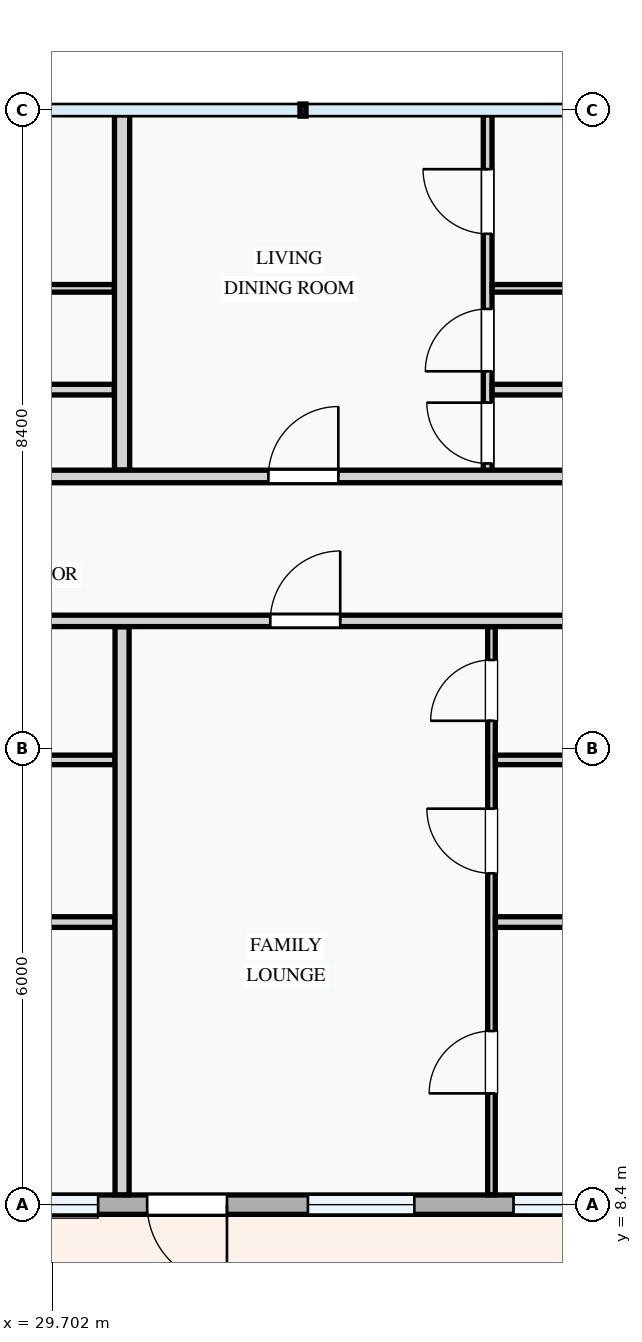
"""IFC4 building model, lengths in metres.
Left out: names, types, materials, properties, quantities, classifications, styles, units other than length and angle.
Written with IfcOpenShell. Run it as: python <this file> out.ifc"""

import sys

from ifc_helpers import new_model, si_unit, direction, frame, frame_2d, origin, place, context, subcontext, project, spatial, rectangle, extrude, element, fill, save


model = new_model("IFC4")
c1 = context("Model", 3, precision=1e-05, world=origin(), true_north=direction((0.0, 1.0)))
c2 = subcontext(c1, "Body", "Model", "MODEL_VIEW")
j1 = project(units=[si_unit("LENGTHUNIT", "METRE"), si_unit("PLANEANGLEUNIT", "RADIAN")], contexts=[c1])
p1 = place(None, origin())
s1 = spatial("IfcSite", under=j1, at=p1, CompositionType="ELEMENT")
p2 = place(p1, origin())
s2 = spatial("IfcBuilding", under=s1, at=p2, CompositionType="ELEMENT")
p3 = place(p2, frame((0.0, 0.0, 31.2)))
s3 = spatial("IfcBuildingStorey", under=s2, at=p3, CompositionType="ELEMENT", Elevation=31.2)
p4 = place(p3, frame((28.8, 8.4, 0.0), z_axis=(0.0, 0.0, 1.0), x_axis=(1.0, 0.0, 0.0)))
e1 = element("IfcWall", 1, at=p4, inside=s3, PredefinedType="STANDARD", context=c2, shape_type="SweptSolid", body=[
    extrude(rectangle(XDim=8.4, YDim=0.255, at=frame_2d((4.2, 0.0))), origin(), (0.0, 0.0, 1.0), 2.375),
])
p5 = place(p4, frame((2.15, 0.0, 0.0)))
e2 = element("IfcOpeningElement", 2, at=p5, cuts=e1, PredefinedType="OPENING", context=c2, shape_type="SweptSolid", body=[
    extrude(rectangle(XDim=1.05, YDim=2.15, at=frame_2d((0.525, 1.075))), frame((0.0, 0.137, 0.0), z_axis=(0.0, -1.0, 0.0), x_axis=(1.0, 0.0, 0.0)), (0.0, 0.0, 1.0), 0.275),
])
p6 = place(p4, frame((0.505, 0.0, 0.78)))
e3 = element("IfcOpeningElement", 3, at=p6, cuts=e1, PredefinedType="OPENING", context=c2, shape_type="SweptSolid", body=[
    extrude(rectangle(XDim=1.0, YDim=1.25, at=frame_2d((0.5, 0.625))), frame((0.0, 0.137, 0.0), z_axis=(0.0, -1.0, 0.0), x_axis=(1.0, 0.0, 0.0)), (0.0, 0.0, 1.0), 0.275),
])
p7 = place(p4, frame((4.265, 0.0, 0.78)))
e4 = element("IfcOpeningElement", 4, at=p7, cuts=e1, PredefinedType="OPENING", context=c2, shape_type="SweptSolid", body=[
    extrude(rectangle(XDim=1.4, YDim=1.45, at=frame_2d((0.7, 0.725))), frame((0.0, 0.137, 0.0), z_axis=(0.0, -1.0, 0.0), x_axis=(1.0, 0.0, 0.0)), (0.0, 0.0, 1.0), 0.275),
])
p8 = place(p4, frame((6.97, 0.0, 0.78)))
e5 = element("IfcOpeningElement", 5, at=p8, cuts=e1, PredefinedType="OPENING", context=c2, shape_type="SweptSolid", body=[
    extrude(rectangle(XDim=0.95, YDim=1.15, at=frame_2d((0.475, 0.575))), frame((0.0, 0.137, 0.0), z_axis=(0.0, -1.0, 0.0), x_axis=(1.0, 0.0, 0.0)), (0.0, 0.0, 1.0), 0.275),
])
p9 = place(p3, frame((26.692, 12.118, 0.0), z_axis=(0.0, 0.0, 1.0), x_axis=(1.0, 0.0, 0.0)))
e6 = element("IfcWall", 6, at=p9, inside=s3, PredefinedType="PARTITIONING", context=c2, shape_type="SweptSolid", body=[
    extrude(rectangle(XDim=3.833, YDim=0.14, at=frame_2d((1.917, 0.0))), origin(), (0.0, 0.0, 1.0), 3.0),
])
p10 = place(p3, frame((26.692, 14.251, 0.0), z_axis=(0.0, 0.0, 1.0), x_axis=(1.0, 0.0, 0.0)))
e7 = element("IfcWall", 7, at=p10, inside=s3, PredefinedType="PARTITIONING", context=c2, shape_type="SweptSolid", body=[
    extrude(rectangle(XDim=3.833, YDim=0.125, at=frame_2d((1.917, 0.0))), origin(), (0.0, 0.0, 1.0), 2.375),
])
p11 = place(p3, frame((26.54, 20.455, 0.0), z_axis=(0.0, 0.0, 1.0), x_axis=(1.0, 0.0, 0.0)))
e8 = element("IfcWall", 8, at=p11, inside=s3, PredefinedType="PARTITIONING", context=c2, shape_type="SweptSolid", body=[
    extrude(rectangle(XDim=3.978, YDim=0.1, at=frame_2d((1.989, 0.0))), origin(), (0.0, 0.0, 1.0), 3.0),
])
p12 = place(p3, frame((26.54, 19.122, 0.0), z_axis=(0.0, 0.0, 1.0), x_axis=(1.0, 0.0, 0.0)))
e9 = element("IfcWall", 9, at=p12, inside=s3, PredefinedType="PARTITIONING", context=c2, shape_type="SweptSolid", body=[
    extrude(rectangle(XDim=3.978, YDim=0.14, at=frame_2d((1.989, 0.0))), origin(), (0.0, 0.0, 1.0), 3.0),
])
p13 = place(p3, frame((35.48, 8.53, 0.0), z_axis=(0.0, 0.0, 1.0), x_axis=(0.0, 1.0, 0.0)))
e10 = element("IfcWall", 10, at=p13, inside=s3, PredefinedType="PARTITIONING", context=c2, shape_type="SweptSolid", body=[
    extrude(rectangle(XDim=7.473, YDim=0.1, at=frame_2d((3.737, 0.0))), origin(), (0.0, 0.0, 1.0), 3.0),
])
p14 = place(p13, frame((1.334, 0.0, 0.0)))
e11 = element("IfcOpeningElement", 11, at=p14, cuts=e10, PredefinedType="OPENING", context=c2, shape_type="SweptSolid", body=[
    extrude(rectangle(XDim=0.82, YDim=2.08, at=frame_2d((0.41, 1.04))), frame((0.0, 0.06, 0.0), z_axis=(0.0, -1.0, 0.0), x_axis=(1.0, 0.0, 0.0)), (0.0, 0.0, 1.0), 0.12),
])
p15 = place(p13, frame((4.23, 0.0, 0.0)))
e12 = element("IfcOpeningElement", 12, at=p15, cuts=e10, PredefinedType="OPENING", context=c2, shape_type="SweptSolid", body=[
    extrude(rectangle(XDim=0.85, YDim=2.1, at=frame_2d((0.425, 1.05))), frame((0.0, 0.06, 0.0), z_axis=(0.0, -1.0, 0.0), x_axis=(1.0, 0.0, 0.0)), (0.0, 0.0, 1.0), 0.12),
])
p16 = place(p13, frame((6.236, 0.0, 0.0)))
e13 = element("IfcOpeningElement", 13, at=p16, cuts=e10, PredefinedType="OPENING", context=c2, shape_type="SweptSolid", body=[
    extrude(rectangle(XDim=0.8, YDim=2.1, at=frame_2d((0.4, 1.05))), frame((0.0, 0.06, 0.0), z_axis=(0.0, -1.0, 0.0), x_axis=(1.0, 0.0, 0.0)), (0.0, 0.0, 1.0), 0.12),
])
p17 = place(p3, frame((35.532, 12.118, 0.0), z_axis=(0.0, 0.0, 1.0), x_axis=(1.0, 0.0, 0.0)))
e14 = element("IfcWall", 14, at=p17, inside=s3, PredefinedType="PARTITIONING", context=c2, shape_type="SweptSolid", body=[
    extrude(rectangle(XDim=7.539, YDim=0.14, at=frame_2d((3.769, 0.0))), origin(), (0.0, 0.0, 1.0), 3.0),
])
p18 = place(p3, frame((35.532, 14.251, 0.0), z_axis=(0.0, 0.0, 1.0), x_axis=(1.0, 0.0, 0.0)))
e15 = element("IfcWall", 15, at=p18, inside=s3, PredefinedType="PARTITIONING", context=c2, shape_type="SweptSolid", body=[
    extrude(rectangle(XDim=7.539, YDim=0.125, at=frame_2d((3.769, 0.0))), origin(), (0.0, 0.0, 1.0), 2.375),
])
p19 = place(p3, frame((35.43, 17.98, 0.0), z_axis=(0.0, 0.0, 1.0), x_axis=(0.0, 1.0, 0.0)))
e16 = element("IfcWall", 16, at=p19, inside=s3, PredefinedType="PARTITIONING", context=c2, shape_type="SweptSolid", body=[
    extrude(rectangle(XDim=4.76, YDim=0.115, at=frame_2d((2.38, 0.0))), origin(), (0.0, 0.0, 1.0), 3.0),
])
p20 = place(p19, frame((0.171, 0.0, 0.0)))
e17 = element("IfcOpeningElement", 17, at=p20, cuts=e16, PredefinedType="OPENING", context=c2, shape_type="SweptSolid", body=[
    extrude(rectangle(XDim=0.8, YDim=2.1, at=frame_2d((0.4, 1.05))), frame((0.0, 0.067, 0.0), z_axis=(0.0, -1.0, 0.0), x_axis=(1.0, 0.0, 0.0)), (0.0, 0.0, 1.0), 0.135),
])
p21 = place(p19, frame((1.384, 0.0, 0.0)))
e18 = element("IfcOpeningElement", 18, at=p21, cuts=e16, PredefinedType="OPENING", context=c2, shape_type="SweptSolid", body=[
    extrude(rectangle(XDim=0.82, YDim=2.08, at=frame_2d((0.41, 1.04))), frame((0.0, 0.067, 0.0), z_axis=(0.0, -1.0, 0.0), x_axis=(1.0, 0.0, 0.0)), (0.0, 0.0, 1.0), 0.135),
])
p22 = place(p19, frame((3.193, 0.0, 0.0)))
e19 = element("IfcOpeningElement", 19, at=p22, cuts=e16, PredefinedType="OPENING", context=c2, shape_type="SweptSolid", body=[
    extrude(rectangle(XDim=0.85, YDim=2.1, at=frame_2d((0.425, 1.05))), frame((0.0, 0.067, 0.0), z_axis=(0.0, -1.0, 0.0), x_axis=(1.0, 0.0, 0.0)), (0.0, 0.0, 1.0), 0.135),
])
p23 = place(p3, frame((35.489, 20.455, 0.0), z_axis=(0.0, 0.0, 1.0), x_axis=(1.0, 0.0, 0.0)))
e20 = element("IfcWall", 20, at=p23, inside=s3, PredefinedType="PARTITIONING", context=c2, shape_type="SweptSolid", body=[
    extrude(rectangle(XDim=7.651, YDim=0.1, at=frame_2d((3.825, 0.0))), origin(), (0.0, 0.0, 1.0), 3.0),
])
p24 = place(p3, frame((35.489, 19.122, 0.0), z_axis=(0.0, 0.0, 1.0), x_axis=(1.0, 0.0, 0.0)))
e21 = element("IfcWall", 21, at=p24, inside=s3, PredefinedType="PARTITIONING", context=c2, shape_type="SweptSolid", body=[
    extrude(rectangle(XDim=7.651, YDim=0.14, at=frame_2d((3.825, 0.0))), origin(), (0.0, 0.0, 1.0), 3.0),
])
p25 = place(p3, frame((30.62, 8.53, 0.0), z_axis=(0.0, 0.0, 1.0), x_axis=(0.0, 1.0, 0.0)))
e22 = element("IfcWall", 22, at=p25, inside=s3, PredefinedType="PARTITIONING", context=c2, shape_type="SweptSolid", body=[
    extrude(rectangle(XDim=7.473, YDim=0.185, at=frame_2d((3.737, 0.0))), origin(), (0.0, 0.0, 1.0), 3.0),
])
p26 = place(p3, frame((30.62, 18.064, 0.0), z_axis=(0.0, 0.0, 1.0), x_axis=(0.0, 1.0, 0.0)))
e23 = element("IfcWall", 23, at=p26, inside=s3, PredefinedType="PARTITIONING", context=c2, shape_type="SweptSolid", body=[
    extrude(rectangle(XDim=4.676, YDim=0.2, at=frame_2d((2.338, 0.0))), origin(), (0.0, 0.0, 1.0), 3.0),
])
p27 = place(p3, frame((22.66, 16.08, 0.0), z_axis=(0.0, 0.0, 1.0), x_axis=(1.0, 0.0, 0.0)))
e24 = element("IfcWall", 24, at=p27, inside=s3, PredefinedType="PARTITIONING", context=c2, shape_type="SweptSolid", body=[
    extrude(rectangle(XDim=20.48, YDim=0.15, at=frame_2d((10.24, 0.0))), origin(), (0.0, 0.0, 1.0), 3.0),
])
p28 = place(p27, frame((2.691, 0.0, 0.0)))
e25 = element("IfcOpeningElement", 25, at=p28, cuts=e24, PredefinedType="OPENING", context=c2, shape_type="SweptSolid", body=[
    extrude(rectangle(XDim=0.96, YDim=2.12, at=frame_2d((0.48, 1.06))), frame((0.0, 0.085, 0.0), z_axis=(0.0, -1.0, 0.0), x_axis=(1.0, 0.0, 0.0)), (0.0, 0.0, 1.0), 0.17),
])
p29 = place(p27, frame((9.91, 0.0, 0.0)))
e26 = element("IfcOpeningElement", 26, at=p29, cuts=e24, PredefinedType="OPENING", context=c2, shape_type="SweptSolid", body=[
    extrude(rectangle(XDim=0.92, YDim=2.1, at=frame_2d((0.46, 1.05))), frame((0.0, 0.085, 0.0), z_axis=(0.0, -1.0, 0.0), x_axis=(1.0, 0.0, 0.0)), (0.0, 0.0, 1.0), 0.17),
])
p30 = place(p3, frame((22.66, 17.98, 0.0), z_axis=(0.0, 0.0, 1.0), x_axis=(1.0, 0.0, 0.0)))
e27 = element("IfcWall", 27, at=p30, inside=s3, PredefinedType="PARTITIONING", context=c2, shape_type="SweptSolid", body=[
    extrude(rectangle(XDim=20.48, YDim=0.165, at=frame_2d((10.24, 0.0))), origin(), (0.0, 0.0, 1.0), 3.0),
])
p31 = place(p30, frame((2.611, 0.0, 0.0)))
e28 = element("IfcOpeningElement", 28, at=p31, cuts=e27, PredefinedType="OPENING", context=c2, shape_type="SweptSolid", body=[
    extrude(rectangle(XDim=0.92, YDim=2.1, at=frame_2d((0.46, 1.05))), frame((0.0, 0.093, 0.0), z_axis=(0.0, -1.0, 0.0), x_axis=(1.0, 0.0, 0.0)), (0.0, 0.0, 1.0), 0.185),
])
p32 = place(p30, frame((9.885, 0.0, 0.0)))
e29 = element("IfcOpeningElement", 29, at=p32, cuts=e27, PredefinedType="OPENING", context=c2, shape_type="SweptSolid", body=[
    extrude(rectangle(XDim=0.92, YDim=2.1, at=frame_2d((0.46, 1.05))), frame((0.0, 0.093, 0.0), z_axis=(0.0, -1.0, 0.0), x_axis=(1.0, 0.0, 0.0)), (0.0, 0.0, 1.0), 0.185),
])
p33 = place(p5, frame((1.05, 0.0, 0.0), z_axis=(0.0, 0.0, 1.0), x_axis=(-1.0, 0.0, 0.0)))
e30 = element("IfcDoor", 30, at=p33, inside=s3, OperationType="SINGLE_SWING_LEFT", PredefinedType="DOOR", context=c2, shape_type="SweptSolid", body=[
    extrude(rectangle(XDim=1.05, YDim=2.15, at=frame_2d((0.525, 1.075))), frame((0.0, 0.025, 0.0), z_axis=(0.0, -1.0, 0.0), x_axis=(1.0, 0.0, 0.0)), (0.0, 0.0, 1.0), 0.05),
])
fill(e2, e30)
p34 = place(p6, origin())
e31 = element("IfcWindow", 31, at=p34, inside=s3, PartitioningType="SINGLE_PANEL", PredefinedType="WINDOW", context=c2, shape_type="SweptSolid", body=[
    extrude(rectangle(XDim=1.0, YDim=1.25, at=frame_2d((0.5, 0.625))), frame((0.0, 0.03, 0.0), z_axis=(0.0, -1.0, 0.0), x_axis=(1.0, 0.0, 0.0)), (0.0, 0.0, 1.0), 0.06),
])
fill(e3, e31)
p35 = place(p7, origin())
e32 = element("IfcWindow", 32, at=p35, inside=s3, PartitioningType="SINGLE_PANEL", PredefinedType="WINDOW", context=c2, shape_type="SweptSolid", body=[
    extrude(rectangle(XDim=1.4, YDim=1.45, at=frame_2d((0.7, 0.725))), frame((0.0, 0.03, 0.0), z_axis=(0.0, -1.0, 0.0), x_axis=(1.0, 0.0, 0.0)), (0.0, 0.0, 1.0), 0.06),
])
fill(e4, e32)
p36 = place(p8, origin())
e33 = element("IfcWindow", 33, at=p36, inside=s3, PartitioningType="SINGLE_PANEL", PredefinedType="WINDOW", context=c2, shape_type="SweptSolid", body=[
    extrude(rectangle(XDim=0.95, YDim=1.15, at=frame_2d((0.475, 0.575))), frame((0.0, 0.03, 0.0), z_axis=(0.0, -1.0, 0.0), x_axis=(1.0, 0.0, 0.0)), (0.0, 0.0, 1.0), 0.06),
])
fill(e5, e33)
p37 = place(p14, origin())
e34 = element("IfcDoor", 34, at=p37, inside=s3, OperationType="SINGLE_SWING_LEFT", PredefinedType="DOOR", context=c2, shape_type="SweptSolid", body=[
    extrude(rectangle(XDim=0.82, YDim=2.08, at=frame_2d((0.41, 1.04))), frame((0.0, 0.025, 0.0), z_axis=(0.0, -1.0, 0.0), x_axis=(1.0, 0.0, 0.0)), (0.0, 0.0, 1.0), 0.05),
])
fill(e11, e34)
p38 = place(p15, origin())
e35 = element("IfcDoor", 35, at=p38, inside=s3, OperationType="SINGLE_SWING_RIGHT", PredefinedType="DOOR", context=c2, shape_type="SweptSolid", body=[
    extrude(rectangle(XDim=0.85, YDim=2.1, at=frame_2d((0.425, 1.05))), frame((0.0, 0.025, 0.0), z_axis=(0.0, -1.0, 0.0), x_axis=(1.0, 0.0, 0.0)), (0.0, 0.0, 1.0), 0.05),
])
fill(e12, e35)
p39 = place(p16, origin())
e36 = element("IfcDoor", 36, at=p39, inside=s3, OperationType="SINGLE_SWING_LEFT", PredefinedType="DOOR", context=c2, shape_type="SweptSolid", body=[
    extrude(rectangle(XDim=0.8, YDim=2.1, at=frame_2d((0.4, 1.05))), frame((0.0, 0.025, 0.0), z_axis=(0.0, -1.0, 0.0), x_axis=(1.0, 0.0, 0.0)), (0.0, 0.0, 1.0), 0.05),
])
fill(e13, e36)
p40 = place(p20, origin())
e37 = element("IfcDoor", 37, at=p40, inside=s3, OperationType="SINGLE_SWING_RIGHT", PredefinedType="DOOR", context=c2, shape_type="SweptSolid", body=[
    extrude(rectangle(XDim=0.8, YDim=2.1, at=frame_2d((0.4, 1.05))), frame((0.0, 0.025, 0.0), z_axis=(0.0, -1.0, 0.0), x_axis=(1.0, 0.0, 0.0)), (0.0, 0.0, 1.0), 0.05),
])
fill(e17, e37)
p41 = place(p21, origin())
e38 = element("IfcDoor", 38, at=p41, inside=s3, OperationType="SINGLE_SWING_LEFT", PredefinedType="DOOR", context=c2, shape_type="SweptSolid", body=[
    extrude(rectangle(XDim=0.82, YDim=2.08, at=frame_2d((0.41, 1.04))), frame((0.0, 0.025, 0.0), z_axis=(0.0, -1.0, 0.0), x_axis=(1.0, 0.0, 0.0)), (0.0, 0.0, 1.0), 0.05),
])
fill(e18, e38)
p42 = place(p22, origin())
e39 = element("IfcDoor", 39, at=p42, inside=s3, OperationType="SINGLE_SWING_RIGHT", PredefinedType="DOOR", context=c2, shape_type="SweptSolid", body=[
    extrude(rectangle(XDim=0.85, YDim=2.1, at=frame_2d((0.425, 1.05))), frame((0.0, 0.025, 0.0), z_axis=(0.0, -1.0, 0.0), x_axis=(1.0, 0.0, 0.0)), (0.0, 0.0, 1.0), 0.05),
])
fill(e19, e39)
p43 = place(p29, origin())
e40 = element("IfcDoor", 40, at=p43, inside=s3, OperationType="SINGLE_SWING_RIGHT", PredefinedType="DOOR", context=c2, shape_type="SweptSolid", body=[
    extrude(rectangle(XDim=0.92, YDim=2.1, at=frame_2d((0.46, 1.05))), frame((0.0, 0.025, 0.0), z_axis=(0.0, -1.0, 0.0), x_axis=(1.0, 0.0, 0.0)), (0.0, 0.0, 1.0), 0.05),
])
fill(e26, e40)
p44 = place(p32, origin())
e41 = element("IfcDoor", 41, at=p44, inside=s3, OperationType="SINGLE_SWING_RIGHT", PredefinedType="DOOR", context=c2, shape_type="SweptSolid", body=[
    extrude(rectangle(XDim=0.92, YDim=2.1, at=frame_2d((0.46, 1.05))), frame((0.0, 0.025, 0.0), z_axis=(0.0, -1.0, 0.0), x_axis=(1.0, 0.0, 0.0)), (0.0, 0.0, 1.0), 0.05),
])
fill(e29, e41)
save(model, sys.argv[1])
